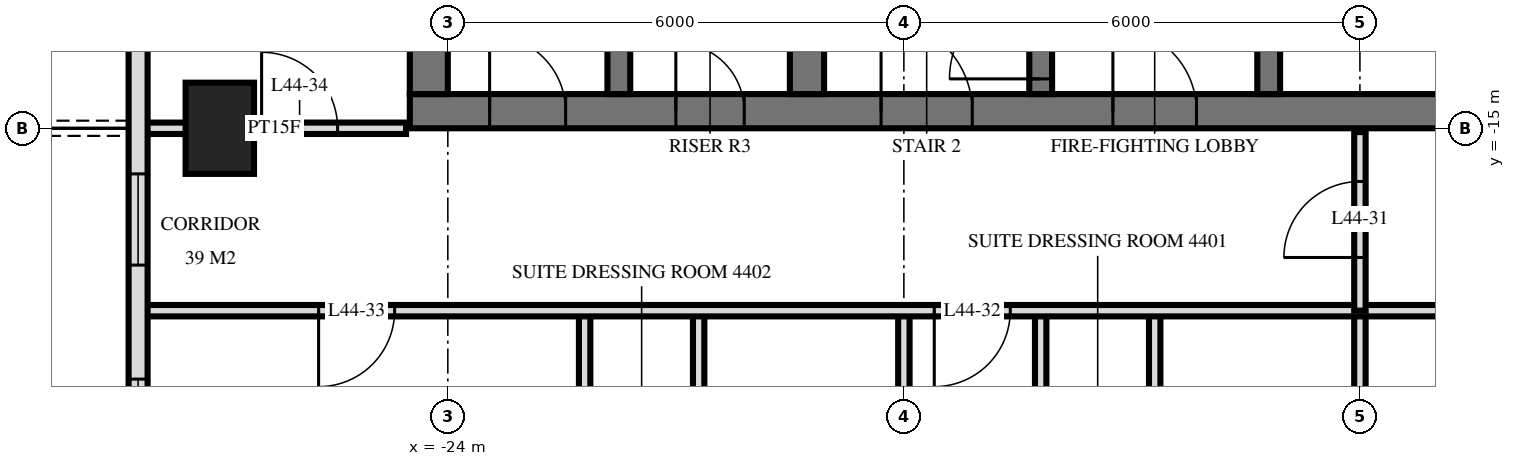
"""IFC4 building model, lengths in metres.
Left out: names, types, materials, properties, quantities, classifications, styles, units other than length and angle.
Written with IfcOpenShell. Run it as: python <this file> out.ifc"""

import sys

from ifc_helpers import new_model, si_unit, direction, frame, frame_2d, origin, origin_2d, place, context, subcontext, project, spatial, rectangle, extrude, element, fill, save


model = new_model("IFC4")
c1 = context("Model", 3, precision=1e-05, world=origin(), true_north=direction((0.0, 1.0)))
c2 = subcontext(c1, "Body", "Model", "MODEL_VIEW")
j1 = project(units=[si_unit("LENGTHUNIT", "METRE"), si_unit("PLANEANGLEUNIT", "RADIAN")], contexts=[c1])
p1 = place(None, origin())
s1 = spatial("IfcSite", under=j1, at=p1, CompositionType="ELEMENT")
p2 = place(p1, origin())
s2 = spatial("IfcBuilding", under=s1, at=p2, CompositionType="ELEMENT")
p3 = place(p2, frame((0.0, 0.0, 170.4)))
s3 = spatial("IfcBuildingStorey", under=s2, at=p3, CompositionType="ELEMENT", Elevation=170.4)
p4 = place(p3, frame((-27.0, -15.0, 0.0), z_axis=(0.0, 0.0, 1.0), x_axis=(0.0, 1.0, 0.0)))
e1 = element("IfcColumn", 1, at=p4, inside=s3, PredefinedType="COLUMN", context=c2, shape_type="SweptSolid", body=[
    extrude(rectangle(XDim=1.2, YDim=0.9, at=origin_2d()), origin(), (0.0, 0.0, 1.0), 3.6),
])
p5 = place(p3, frame((-24.5, -14.775, 0.0), z_axis=(0.0, 0.0, 1.0), x_axis=(1.0, 0.0, 0.0)))
e2 = element("IfcWall", 2, at=p5, inside=s3, PredefinedType="SHEAR", context=c2, shape_type="SweptSolid", body=[
    extrude(rectangle(XDim=14.5, YDim=0.45, at=frame_2d((7.25, 0.0))), origin(), (0.0, 0.0, 1.0), 3.6),
])
p6 = place(p5, frame((6.2, 0.0, 0.0)))
e3 = element("IfcOpeningElement", 3, at=p6, cuts=e2, PredefinedType="OPENING", context=c2, shape_type="SweptSolid", body=[
    extrude(rectangle(XDim=1.2, YDim=2.1, at=frame_2d((0.6, 1.05))), frame((0.0, 0.235, 0.0), z_axis=(0.0, -1.0, 0.0), x_axis=(1.0, 0.0, 0.0)), (0.0, 0.0, 1.0), 0.47),
])
p7 = place(p5, frame((9.25, 0.0, 0.0)))
e4 = element("IfcOpeningElement", 4, at=p7, cuts=e2, PredefinedType="OPENING", context=c2, shape_type="SweptSolid", body=[
    extrude(rectangle(XDim=1.1, YDim=2.1, at=frame_2d((0.55, 1.05))), frame((0.0, 0.235, 0.0), z_axis=(0.0, -1.0, 0.0), x_axis=(1.0, 0.0, 0.0)), (0.0, 0.0, 1.0), 0.47),
])
p8 = place(p5, frame((3.5, 0.0, 0.0)))
e5 = element("IfcOpeningElement", 5, at=p8, cuts=e2, PredefinedType="OPENING", context=c2, shape_type="SweptSolid", body=[
    extrude(rectangle(XDim=0.9, YDim=2.1, at=frame_2d((0.45, 1.05))), frame((0.0, 0.235, 0.0), z_axis=(0.0, -1.0, 0.0), x_axis=(1.0, 0.0, 0.0)), (0.0, 0.0, 1.0), 0.47),
])
p9 = place(p5, frame((1.05, 0.0, 0.0)))
e6 = element("IfcOpeningElement", 6, at=p9, cuts=e2, PredefinedType="OPENING", context=c2, shape_type="SweptSolid", body=[
    extrude(rectangle(XDim=1.0, YDim=2.1, at=frame_2d((0.5, 1.05))), frame((0.0, 0.235, 0.0), z_axis=(0.0, -1.0, 0.0), x_axis=(1.0, 0.0, 0.0)), (0.0, 0.0, 1.0), 0.47),
])
p10 = place(p3, frame((-24.25, -14.55, 0.0), z_axis=(0.0, 0.0, 1.0), x_axis=(0.0, 1.0, 0.0)))
e7 = element("IfcWall", 7, at=p10, inside=s3, PredefinedType="SHEAR", context=c2, shape_type="SweptSolid", body=[
    extrude(rectangle(XDim=14.1, YDim=0.5, at=frame_2d((7.05, 0.0))), origin(), (0.0, 0.0, 1.0), 3.6),
])
p11 = place(p3, frame((-13.2, -14.55, 0.0), z_axis=(0.0, 0.0, 1.0), x_axis=(0.0, 1.0, 0.0)))
e8 = element("IfcWall", 8, at=p11, inside=s3, PredefinedType="SHEAR", context=c2, shape_type="SweptSolid", body=[
    extrude(rectangle(XDim=5.4, YDim=0.3, at=frame_2d((2.7, 0.0))), origin(), (0.0, 0.0, 1.0), 3.6),
])
p12 = place(p11, frame((4.0, 0.0, 0.0)))
e9 = element("IfcOpeningElement", 9, at=p12, cuts=e8, PredefinedType="OPENING", context=c2, shape_type="SweptSolid", body=[
    extrude(rectangle(XDim=1.2, YDim=2.1, at=frame_2d((0.6, 1.05))), frame((0.0, 0.16, 0.0), z_axis=(0.0, -1.0, 0.0), x_axis=(1.0, 0.0, 0.0)), (0.0, 0.0, 1.0), 0.32),
])
p13 = place(p3, frame((-16.2, -14.55, 0.0), z_axis=(0.0, 0.0, 1.0), x_axis=(0.0, 1.0, 0.0)))
e10 = element("IfcWall", 10, at=p13, inside=s3, PredefinedType="SHEAR", context=c2, shape_type="SweptSolid", body=[
    extrude(rectangle(XDim=5.4, YDim=0.3, at=frame_2d((2.7, 0.0))), origin(), (0.0, 0.0, 1.0), 3.6),
])
p14 = place(p13, frame((0.2, 0.0, 0.0)))
e11 = element("IfcOpeningElement", 11, at=p14, cuts=e10, PredefinedType="OPENING", context=c2, shape_type="SweptSolid", body=[
    extrude(rectangle(XDim=1.2, YDim=2.1, at=frame_2d((0.6, 1.05))), frame((0.0, 0.16, 0.0), z_axis=(0.0, -1.0, 0.0), x_axis=(1.0, 0.0, 0.0)), (0.0, 0.0, 1.0), 0.32),
])
p15 = place(p3, frame((-19.275, -14.55, 0.0), z_axis=(0.0, 0.0, 1.0), x_axis=(0.0, 1.0, 0.0)))
e12 = element("IfcWall", 12, at=p15, inside=s3, PredefinedType="SHEAR", context=c2, shape_type="SweptSolid", body=[
    extrude(rectangle(XDim=5.4, YDim=0.45, at=frame_2d((2.7, 0.0))), origin(), (0.0, 0.0, 1.0), 3.6),
])
p16 = place(p3, frame((-21.75, -14.55, 0.0), z_axis=(0.0, 0.0, 1.0), x_axis=(0.0, 1.0, 0.0)))
e13 = element("IfcWall", 13, at=p16, inside=s3, PredefinedType="SHEAR", context=c2, shape_type="SweptSolid", body=[
    extrude(rectangle(XDim=5.4, YDim=0.3, at=frame_2d((2.7, 0.0))), origin(), (0.0, 0.0, 1.0), 3.6),
])
p17 = place(p3, frame((-28.075, -3.325, 0.0), z_axis=(0.0, 0.0, 1.0), x_axis=(0.0, -1.0, 0.0)))
e14 = element("IfcWall", 14, at=p17, inside=s3, PredefinedType="SOLIDWALL", context=c2, shape_type="SweptSolid", body=[
    extrude(rectangle(XDim=25.951, YDim=0.25, at=frame_2d((12.975, 0.0))), origin(), (0.0, 0.0, 1.0), 3.32),
])
p18 = place(p17, frame((7.525, 0.0, 0.0)))
e15 = element("IfcOpeningElement", 15, at=p18, cuts=e14, PredefinedType="OPENING", context=c2, shape_type="SweptSolid", body=[
    extrude(rectangle(XDim=1.8, YDim=2.4, at=frame_2d((0.9, 1.2))), frame((0.0, 0.135, 0.0), z_axis=(0.0, -1.0, 0.0), x_axis=(1.0, 0.0, 0.0)), (0.0, 0.0, 1.0), 0.27),
])
p19 = place(p17, frame((12.275, 0.0, 0.3)))
e16 = element("IfcOpeningElement", 16, at=p19, cuts=e14, PredefinedType="OPENING", context=c2, shape_type="SweptSolid", body=[
    extrude(rectangle(XDim=1.2, YDim=2.1, at=frame_2d((0.6, 1.05))), frame((0.0, 0.135, 0.0), z_axis=(0.0, -1.0, 0.0), x_axis=(1.0, 0.0, 0.0)), (0.0, 0.0, 1.0), 0.27),
])
p20 = place(p17, frame((14.975, 0.0, 0.3)))
e17 = element("IfcOpeningElement", 17, at=p20, cuts=e14, PredefinedType="OPENING", context=c2, shape_type="SweptSolid", body=[
    extrude(rectangle(XDim=2.4, YDim=2.1, at=frame_2d((1.2, 1.05))), frame((0.0, 0.135, 0.0), z_axis=(0.0, -1.0, 0.0), x_axis=(1.0, 0.0, 0.0)), (0.0, 0.0, 1.0), 0.27),
])
p21 = place(p17, frame((18.175, 0.0, 0.0)))
e18 = element("IfcOpeningElement", 18, at=p21, cuts=e14, PredefinedType="OPENING", context=c2, shape_type="SweptSolid", body=[
    extrude(rectangle(XDim=1.8, YDim=2.4, at=frame_2d((0.9, 1.2))), frame((0.0, 0.135, 0.0), z_axis=(0.0, -1.0, 0.0), x_axis=(1.0, 0.0, 0.0)), (0.0, 0.0, 1.0), 0.27),
])
p22 = place(p17, frame((21.075, 0.0, 0.0)))
e19 = element("IfcOpeningElement", 19, at=p22, cuts=e14, PredefinedType="OPENING", context=c2, shape_type="SweptSolid", body=[
    extrude(rectangle(XDim=1.8, YDim=2.4, at=frame_2d((0.9, 1.2))), frame((0.0, 0.135, 0.0), z_axis=(0.0, -1.0, 0.0), x_axis=(1.0, 0.0, 0.0)), (0.0, 0.0, 1.0), 0.27),
])
p23 = place(p17, frame((23.825, 0.0, 0.3)))
e20 = element("IfcOpeningElement", 20, at=p23, cuts=e14, PredefinedType="OPENING", context=c2, shape_type="SweptSolid", body=[
    extrude(rectangle(XDim=1.8, YDim=2.1, at=frame_2d((0.9, 1.05))), frame((0.0, 0.135, 0.0), z_axis=(0.0, -1.0, 0.0), x_axis=(1.0, 0.0, 0.0)), (0.0, 0.0, 1.0), 0.27),
])
p24 = place(p3, frame((-12.0, -17.4, 0.0), z_axis=(0.0, 0.0, 1.0), x_axis=(0.0, 1.0, 0.0)))
e21 = element("IfcWall", 21, at=p24, inside=s3, PredefinedType="PARTITIONING", context=c2, shape_type="SweptSolid", body=[
    extrude(rectangle(XDim=2.35, YDim=0.15, at=frame_2d((1.175, 0.0))), origin(), (0.0, 0.0, 1.0), 3.32),
])
p25 = place(p24, frame((0.7, 0.0, 0.0)))
e22 = element("IfcOpeningElement", 22, at=p25, cuts=e21, PredefinedType="OPENING", context=c2, shape_type="SweptSolid", body=[
    extrude(rectangle(XDim=1.0, YDim=2.1, at=frame_2d((0.5, 1.05))), frame((0.0, 0.085, 0.0), z_axis=(0.0, -1.0, 0.0), x_axis=(1.0, 0.0, 0.0)), (0.0, 0.0, 1.0), 0.17),
])
p26 = place(p3, frame((-12.0, -33.62, 0.0), z_axis=(0.0, 0.0, 1.0), x_axis=(0.0, 1.0, 0.0)))
e23 = element("IfcWall", 23, at=p26, inside=s3, PredefinedType="PARTITIONING", context=c2, shape_type="SweptSolid", body=[
    extrude(rectangle(XDim=16.22, YDim=0.15, at=frame_2d((8.11, 0.0))), origin(), (0.0, 0.0, 1.0), 3.32),
])
p27 = place(p3, frame((-14.7, -22.4, 0.0), z_axis=(0.0, 0.0, 1.0), x_axis=(0.0, 1.0, 0.0)))
e24 = element("IfcWall", 24, at=p27, inside=s3, PredefinedType="PARTITIONING", context=c2, shape_type="SweptSolid", body=[
    extrude(rectangle(XDim=5.0, YDim=0.15, at=frame_2d((2.5, 0.0))), origin(), (0.0, 0.0, 1.0), 3.32),
])
p28 = place(p3, frame((-16.2, -22.4, 0.0), z_axis=(0.0, 0.0, 1.0), x_axis=(0.0, 1.0, 0.0)))
e25 = element("IfcWall", 25, at=p28, inside=s3, PredefinedType="PARTITIONING", context=c2, shape_type="SweptSolid", body=[
    extrude(rectangle(XDim=5.0, YDim=0.15, at=frame_2d((2.5, 0.0))), origin(), (0.0, 0.0, 1.0), 3.32),
])
p29 = place(p28, frame((2.05, 0.0, 0.0)))
e26 = element("IfcOpeningElement", 26, at=p29, cuts=e25, PredefinedType="OPENING", context=c2, shape_type="SweptSolid", body=[
    extrude(rectangle(XDim=0.9, YDim=2.1, at=frame_2d((0.45, 1.05))), frame((0.0, 0.085, 0.0), z_axis=(0.0, -1.0, 0.0), x_axis=(1.0, 0.0, 0.0)), (0.0, 0.0, 1.0), 0.17),
])
p30 = place(p3, frame((-18.0, -33.62, 0.0), z_axis=(0.0, 0.0, 1.0), x_axis=(0.0, 1.0, 0.0)))
e27 = element("IfcWall", 27, at=p30, inside=s3, PredefinedType="PARTITIONING", context=c2, shape_type="SweptSolid", body=[
    extrude(rectangle(XDim=16.22, YDim=0.15, at=frame_2d((8.11, 0.0))), origin(), (0.0, 0.0, 1.0), 3.32),
])
p31 = place(p3, frame((-20.7, -21.6, 0.0), z_axis=(0.0, 0.0, 1.0), x_axis=(0.0, 1.0, 0.0)))
e28 = element("IfcWall", 28, at=p31, inside=s3, PredefinedType="PARTITIONING", context=c2, shape_type="SweptSolid", body=[
    extrude(rectangle(XDim=4.2, YDim=0.15, at=frame_2d((2.1, 0.0))), origin(), (0.0, 0.0, 1.0), 3.32),
])
p32 = place(p3, frame((-22.2, -21.6, 0.0), z_axis=(0.0, 0.0, 1.0), x_axis=(0.0, 1.0, 0.0)))
e29 = element("IfcWall", 29, at=p32, inside=s3, PredefinedType="PARTITIONING", context=c2, shape_type="SweptSolid", body=[
    extrude(rectangle(XDim=4.2, YDim=0.15, at=frame_2d((2.1, 0.0))), origin(), (0.0, 0.0, 1.0), 3.32),
])
p33 = place(p32, frame((1.65, 0.0, 0.0)))
e30 = element("IfcOpeningElement", 30, at=p33, cuts=e29, PredefinedType="OPENING", context=c2, shape_type="SweptSolid", body=[
    extrude(rectangle(XDim=0.9, YDim=2.1, at=frame_2d((0.45, 1.05))), frame((0.0, 0.085, 0.0), z_axis=(0.0, -1.0, 0.0), x_axis=(1.0, 0.0, 0.0)), (0.0, 0.0, 1.0), 0.17),
])
p34 = place(p3, frame((-28.02, -17.4, 0.0), z_axis=(0.0, 0.0, 1.0), x_axis=(1.0, 0.0, 0.0)))
e31 = element("IfcWall", 31, at=p34, inside=s3, PredefinedType="PARTITIONING", context=c2, shape_type="SweptSolid", body=[
    extrude(rectangle(XDim=56.04, YDim=0.15, at=frame_2d((28.02, 0.0))), origin(), (0.0, 0.0, 1.0), 3.32),
])
p35 = place(p34, frame((10.42, 0.0, 0.0)))
e32 = element("IfcOpeningElement", 32, at=p35, cuts=e31, PredefinedType="OPENING", context=c2, shape_type="SweptSolid", body=[
    extrude(rectangle(XDim=1.0, YDim=2.1, at=frame_2d((0.5, 1.05))), frame((0.0, 0.085, 0.0), z_axis=(0.0, -1.0, 0.0), x_axis=(1.0, 0.0, 0.0)), (0.0, 0.0, 1.0), 0.17),
])
p36 = place(p34, frame((2.32, 0.0, 0.0)))
e33 = element("IfcOpeningElement", 33, at=p36, cuts=e31, PredefinedType="OPENING", context=c2, shape_type="SweptSolid", body=[
    extrude(rectangle(XDim=1.0, YDim=2.1, at=frame_2d((0.5, 1.05))), frame((0.0, 0.085, 0.0), z_axis=(0.0, -1.0, 0.0), x_axis=(1.0, 0.0, 0.0)), (0.0, 0.0, 1.0), 0.17),
])
p37 = place(p34, frame((49.72, 0.0, 0.0)))
e34 = element("IfcOpeningElement", 34, at=p37, cuts=e31, PredefinedType="OPENING", context=c2, shape_type="SweptSolid", body=[
    extrude(rectangle(XDim=1.0, YDim=2.1, at=frame_2d((0.5, 1.05))), frame((0.0, 0.085, 0.0), z_axis=(0.0, -1.0, 0.0), x_axis=(1.0, 0.0, 0.0)), (0.0, 0.0, 1.0), 0.17),
])
p38 = place(p34, frame((23.02, 0.0, 0.0)))
e35 = element("IfcOpeningElement", 35, at=p38, cuts=e31, PredefinedType="OPENING", context=c2, shape_type="SweptSolid", body=[
    extrude(rectangle(XDim=1.0, YDim=2.1, at=frame_2d((0.5, 1.05))), frame((0.0, 0.085, 0.0), z_axis=(0.0, -1.0, 0.0), x_axis=(1.0, 0.0, 0.0)), (0.0, 0.0, 1.0), 0.17),
])
p39 = place(p34, frame((35.02, 0.0, 0.0)))
e36 = element("IfcOpeningElement", 36, at=p39, cuts=e31, PredefinedType="OPENING", context=c2, shape_type="SweptSolid", body=[
    extrude(rectangle(XDim=1.0, YDim=2.1, at=frame_2d((0.5, 1.05))), frame((0.0, 0.085, 0.0), z_axis=(0.0, -1.0, 0.0), x_axis=(1.0, 0.0, 0.0)), (0.0, 0.0, 1.0), 0.17),
])
p40 = place(p3, frame((-28.02, -15.0, 0.0), z_axis=(0.0, 0.0, 1.0), x_axis=(1.0, 0.0, 0.0)))
e37 = element("IfcWall", 37, at=p40, inside=s3, PredefinedType="PARTITIONING", context=c2, shape_type="SweptSolid", body=[
    extrude(rectangle(XDim=3.47, YDim=0.15, at=frame_2d((1.735, 0.0))), origin(), (0.0, 0.0, 1.0), 3.32),
])
p41 = place(p40, frame((1.57, 0.0, 0.0)))
e38 = element("IfcOpeningElement", 38, at=p41, cuts=e37, PredefinedType="OPENING", context=c2, shape_type="SweptSolid", body=[
    extrude(rectangle(XDim=1.0, YDim=2.1, at=frame_2d((0.5, 1.05))), frame((0.0, 0.085, 0.0), z_axis=(0.0, -1.0, 0.0), x_axis=(1.0, 0.0, 0.0)), (0.0, 0.0, 1.0), 0.17),
])
p42 = place(p19, origin())
e39 = element("IfcWindow", 39, at=p42, inside=s3, PartitioningType="SINGLE_PANEL", PredefinedType="WINDOW", context=c2, shape_type="SweptSolid", body=[
    extrude(rectangle(XDim=1.2, YDim=2.1, at=frame_2d((0.6, 1.05))), frame((0.0, 0.03, 0.0), z_axis=(0.0, -1.0, 0.0), x_axis=(1.0, 0.0, 0.0)), (0.0, 0.0, 1.0), 0.06),
])
fill(e16, e39)
p43 = place(p20, origin())
e40 = element("IfcWindow", 40, at=p43, inside=s3, PartitioningType="SINGLE_PANEL", PredefinedType="WINDOW", context=c2, shape_type="SweptSolid", body=[
    extrude(rectangle(XDim=2.4, YDim=2.1, at=frame_2d((1.2, 1.05))), frame((0.0, 0.03, 0.0), z_axis=(0.0, -1.0, 0.0), x_axis=(1.0, 0.0, 0.0)), (0.0, 0.0, 1.0), 0.06),
])
fill(e17, e40)
p44 = place(p6, origin())
e41 = element("IfcDoor", 41, at=p44, inside=s3, OperationType="SINGLE_SWING_RIGHT", PredefinedType="DOOR", context=c2, shape_type="SweptSolid", body=[
    extrude(rectangle(XDim=1.2, YDim=2.1, at=frame_2d((0.6, 1.05))), frame((0.0, 0.025, 0.0), z_axis=(0.0, -1.0, 0.0), x_axis=(1.0, 0.0, 0.0)), (0.0, 0.0, 1.0), 0.05),
])
fill(e3, e41)
p45 = place(p7, origin())
e42 = element("IfcDoor", 42, at=p45, inside=s3, OperationType="SINGLE_SWING_RIGHT", PredefinedType="DOOR", context=c2, shape_type="SweptSolid", body=[
    extrude(rectangle(XDim=1.1, YDim=2.1, at=frame_2d((0.55, 1.05))), frame((0.0, 0.025, 0.0), z_axis=(0.0, -1.0, 0.0), x_axis=(1.0, 0.0, 0.0)), (0.0, 0.0, 1.0), 0.05),
])
fill(e4, e42)
p46 = place(p8, origin())
e43 = element("IfcDoor", 43, at=p46, inside=s3, OperationType="SINGLE_SWING_RIGHT", PredefinedType="DOOR", context=c2, shape_type="SweptSolid", body=[
    extrude(rectangle(XDim=0.9, YDim=2.1, at=frame_2d((0.45, 1.05))), frame((0.0, 0.025, 0.0), z_axis=(0.0, -1.0, 0.0), x_axis=(1.0, 0.0, 0.0)), (0.0, 0.0, 1.0), 0.05),
])
fill(e5, e43)
p47 = place(p9, origin())
e44 = element("IfcDoor", 44, at=p47, inside=s3, OperationType="SINGLE_SWING_RIGHT", PredefinedType="DOOR", context=c2, shape_type="SweptSolid", body=[
    extrude(rectangle(XDim=1.0, YDim=2.1, at=frame_2d((0.5, 1.05))), frame((0.0, 0.025, 0.0), z_axis=(0.0, -1.0, 0.0), x_axis=(1.0, 0.0, 0.0)), (0.0, 0.0, 1.0), 0.05),
])
fill(e6, e44)
p48 = place(p14, origin())
e45 = element("IfcDoor", 45, at=p48, inside=s3, OperationType="SINGLE_SWING_RIGHT", PredefinedType="DOOR", context=c2, shape_type="SweptSolid", body=[
    extrude(rectangle(XDim=1.2, YDim=2.1, at=frame_2d((0.6, 1.05))), frame((0.0, 0.025, 0.0), z_axis=(0.0, -1.0, 0.0), x_axis=(1.0, 0.0, 0.0)), (0.0, 0.0, 1.0), 0.05),
])
fill(e11, e45)
p49 = place(p25, origin())
e46 = element("IfcDoor", 46, at=p49, inside=s3, OperationType="SINGLE_SWING_RIGHT", PredefinedType="DOOR", context=c2, shape_type="SweptSolid", body=[
    extrude(rectangle(XDim=1.0, YDim=2.1, at=frame_2d((0.5, 1.05))), frame((0.0, 0.025, 0.0), z_axis=(0.0, -1.0, 0.0), x_axis=(1.0, 0.0, 0.0)), (0.0, 0.0, 1.0), 0.05),
])
fill(e22, e46)
p50 = place(p35, frame((0.5, 0.0, 0.0), z_axis=(0.0, 0.0, 1.0), x_axis=(-1.0, 0.0, 0.0)))
e47 = element("IfcDoor", 47, at=p50, inside=s3, OperationType="SINGLE_SWING_LEFT", PredefinedType="DOOR", context=c2, shape_type="SweptSolid", body=[
    extrude(rectangle(XDim=1.0, YDim=2.1, at=frame_2d((0.0, 1.05))), frame((0.0, -0.025, 0.0), z_axis=(0.0, 1.0, 0.0), x_axis=(-1.0, 0.0, 0.0)), (0.0, 0.0, 1.0), 0.05),
])
fill(e32, e47)
p51 = place(p36, frame((0.5, 0.0, 0.0), z_axis=(0.0, 0.0, 1.0), x_axis=(-1.0, 0.0, 0.0)))
e48 = element("IfcDoor", 48, at=p51, inside=s3, OperationType="SINGLE_SWING_LEFT", PredefinedType="DOOR", context=c2, shape_type="SweptSolid", body=[
    extrude(rectangle(XDim=1.0, YDim=2.1, at=frame_2d((0.0, 1.05))), frame((0.0, -0.025, 0.0), z_axis=(0.0, 1.0, 0.0), x_axis=(-1.0, 0.0, 0.0)), (0.0, 0.0, 1.0), 0.05),
])
fill(e33, e48)
p52 = place(p41, origin())
e49 = element("IfcDoor", 49, at=p52, inside=s3, OperationType="SINGLE_SWING_RIGHT", PredefinedType="DOOR", context=c2, shape_type="SweptSolid", body=[
    extrude(rectangle(XDim=1.0, YDim=2.1, at=frame_2d((0.5, 1.05))), frame((0.0, 0.025, 0.0), z_axis=(0.0, -1.0, 0.0), x_axis=(1.0, 0.0, 0.0)), (0.0, 0.0, 1.0), 0.05),
])
fill(e38, e49)
save(model, sys.argv[1])
